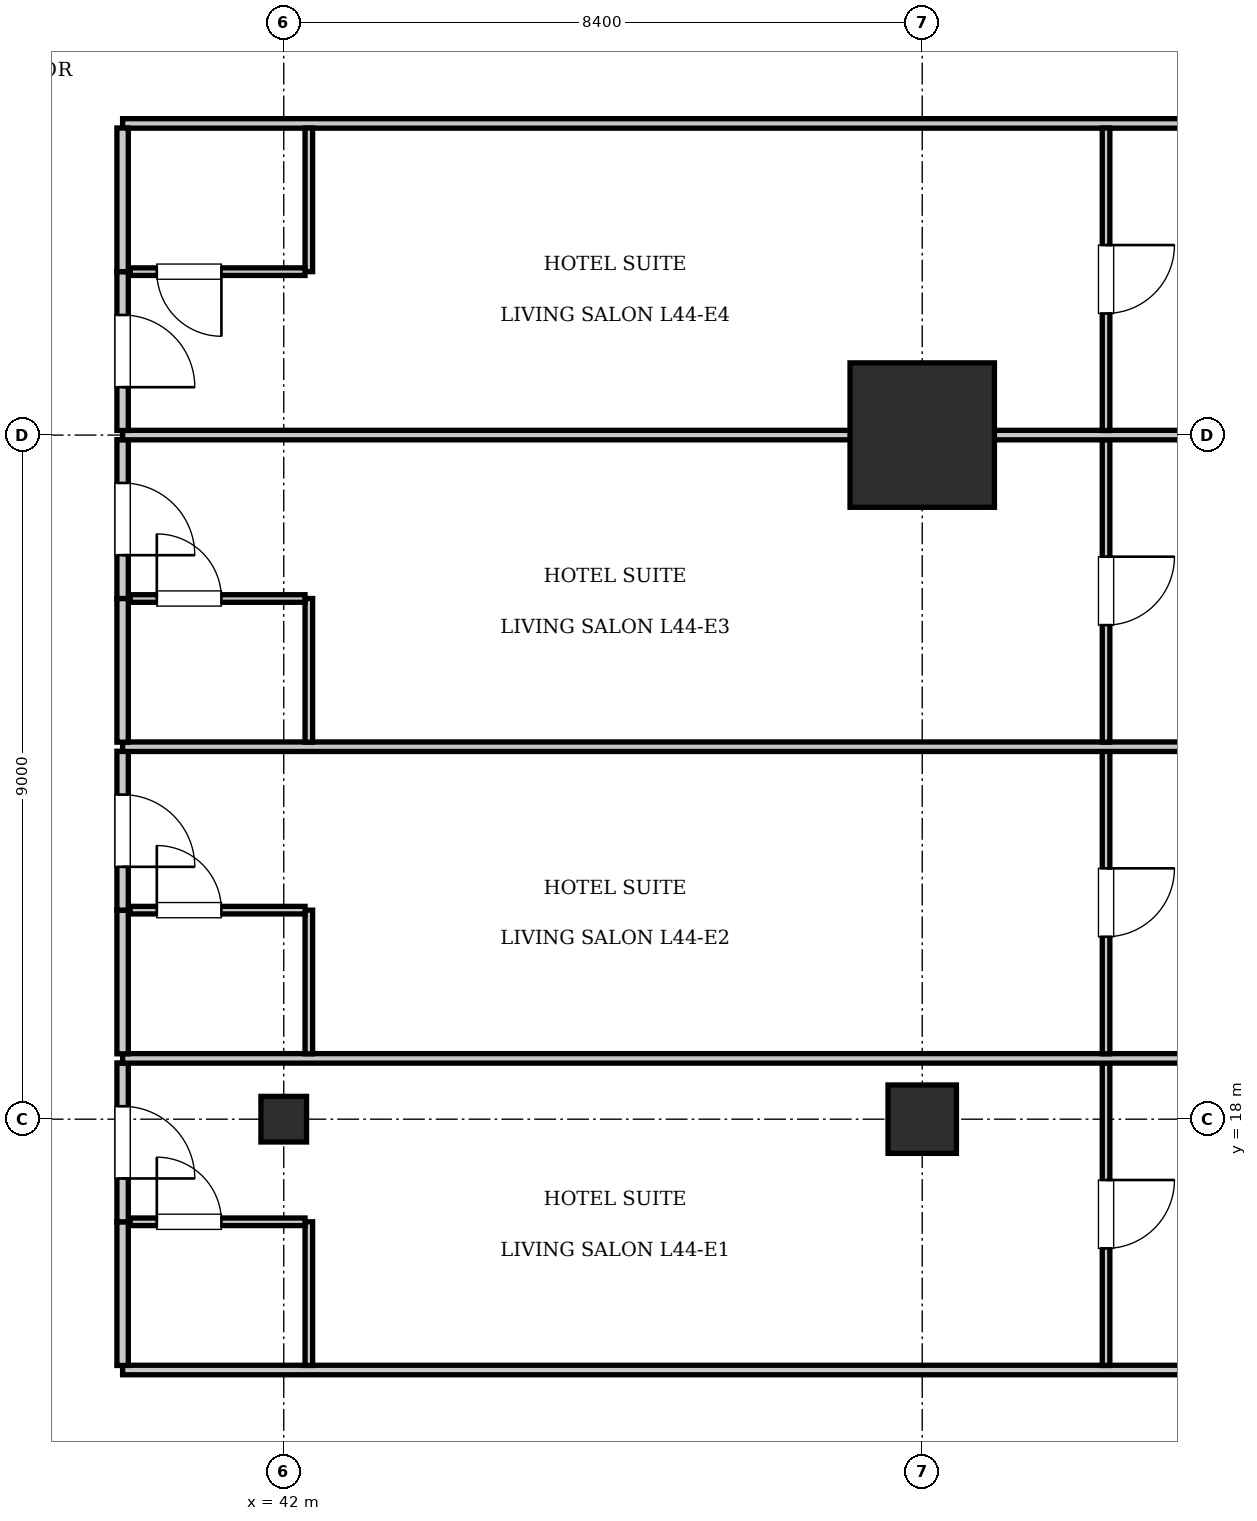
"""IFC4 building model, lengths in metres.
Left out: names, types, materials, properties, quantities, classifications, styles, units other than length and angle.
Written with IfcOpenShell. Run it as: python <this file> out.ifc"""

import sys

from ifc_helpers import new_model, si_unit, direction, frame, frame_2d, origin, origin_2d, place, context, subcontext, project, spatial, rectangle, i_section, extrude, element, fill, save


model = new_model("IFC4")
c1 = context("Model", 3, precision=1e-05, world=origin(), true_north=direction((0.0, 1.0)))
c2 = subcontext(c1, "Body", "Model", "MODEL_VIEW")
j1 = project(units=[si_unit("LENGTHUNIT", "METRE"), si_unit("PLANEANGLEUNIT", "RADIAN")], contexts=[c1])
p1 = place(None, origin())
s1 = spatial("IfcSite", under=j1, at=p1, CompositionType="ELEMENT")
p2 = place(p1, origin())
s2 = spatial("IfcBuilding", under=s1, at=p2, CompositionType="ELEMENT")
p3 = place(p2, frame((0.0, 0.0, 181.3)))
s3 = spatial("IfcBuildingStorey", under=s2, at=p3, CompositionType="ELEMENT", Elevation=181.3)
p4 = place(p3, frame((50.4, 27.0, 0.0), z_axis=(0.0, 0.0, 1.0), x_axis=(1.0, 0.0, 0.0)))
e1 = element("IfcColumn", 1, at=p4, inside=s3, PredefinedType="COLUMN", context=c2, shape_type="SweptSolid", body=[
    extrude(rectangle(XDim=1.9, YDim=1.9, at=origin_2d()), origin(), (0.0, 0.0, 1.0), 3.85),
])
p5 = place(p3, frame((50.4, 18.0, 0.0), z_axis=(0.0, 0.0, 1.0), x_axis=(1.0, 0.0, 0.0)))
e2 = element("IfcColumn", 2, at=p5, inside=s3, PredefinedType="COLUMN", context=c2, shape_type="SweptSolid", body=[
    extrude(rectangle(XDim=0.9, YDim=0.9, at=origin_2d()), origin(), (0.0, 0.0, 1.0), 3.85),
])
p6 = place(p3, frame((42.0, 18.0, 0.0), z_axis=(0.0, 0.0, 1.0), x_axis=(1.0, 0.0, 0.0)))
e3 = element("IfcColumn", 3, at=p6, inside=s3, PredefinedType="COLUMN", context=c2, shape_type="SweptSolid", body=[
    extrude(i_section(OverallWidth=0.6, OverallDepth=0.6, WebThickness=0.025, FlangeThickness=0.038, at=origin_2d()), origin(), (0.0, 0.0, 1.0), 3.85),
])
for number, where, z_axis, x_axis in (
    (4, (39.88, 14.7, 0.0), (0.0, 0.0, 1.0), (1.0, 0.0, 0.0)),
    (5, (39.88, 31.1, 0.0), (0.0, 0.0, 1.0), (1.0, 0.0, 0.0)),
):
    element("IfcWall", number, at=place(p3, frame(where, z_axis=z_axis, x_axis=x_axis)), inside=s3, PredefinedType="PARTITIONING", context=c2, shape_type="SweptSolid", body=[
        extrude(rectangle(XDim=22.52, YDim=0.125, at=frame_2d((11.26, 0.0))), origin(), (0.0, 0.0, 1.0), 3.61),
    ])
p7 = place(p3, frame((39.88, 14.76, 0.0), z_axis=(0.0, 0.0, 1.0), x_axis=(0.0, 1.0, 0.0)))
e6 = element("IfcWall", 6, at=p7, inside=s3, PredefinedType="PARTITIONING", context=c2, shape_type="SweptSolid", body=[
    extrude(rectangle(XDim=1.89, YDim=0.15, at=frame_2d((0.945, 0.0))), origin(), (0.0, 0.0, 1.0), 3.61),
])
p8 = place(p3, frame((39.88, 16.65, 0.0), z_axis=(0.0, 0.0, 1.0), x_axis=(0.0, 1.0, 0.0)))
e7 = element("IfcWall", 7, at=p8, inside=s3, PredefinedType="PARTITIONING", context=c2, shape_type="SweptSolid", body=[
    extrude(rectangle(XDim=2.09, YDim=0.15, at=frame_2d((1.045, 0.0))), origin(), (0.0, 0.0, 1.0), 3.61),
])
p9 = place(p8, frame((0.57, 0.0, 0.0)))
e8 = element("IfcOpeningElement", 8, at=p9, cuts=e7, PredefinedType="OPENING", context=c2, shape_type="SweptSolid", body=[
    extrude(rectangle(XDim=0.95, YDim=2.15, at=frame_2d((0.475, 1.075))), frame((0.0, 0.085, 0.0), z_axis=(0.0, -1.0, 0.0), x_axis=(1.0, 0.0, 0.0)), (0.0, 0.0, 1.0), 0.17),
])
p10 = place(p3, frame((42.33, 14.76, 0.0), z_axis=(0.0, 0.0, 1.0), x_axis=(0.0, 1.0, 0.0)))
e9 = element("IfcWall", 9, at=p10, inside=s3, PredefinedType="PARTITIONING", context=c2, shape_type="SweptSolid", body=[
    extrude(rectangle(XDim=1.89, YDim=0.1, at=frame_2d((0.945, 0.0))), origin(), (0.0, 0.0, 1.0), 3.61),
])
p11 = place(p3, frame((39.98, 16.65, 0.0), z_axis=(0.0, 0.0, 1.0), x_axis=(1.0, 0.0, 0.0)))
e10 = element("IfcWall", 10, at=p11, inside=s3, PredefinedType="PARTITIONING", context=c2, shape_type="SweptSolid", body=[
    extrude(rectangle(XDim=2.3, YDim=0.1, at=frame_2d((1.15, 0.0))), origin(), (0.0, 0.0, 1.0), 3.61),
])
p12 = place(p11, frame((0.35, 0.0, 0.0)))
e11 = element("IfcOpeningElement", 11, at=p12, cuts=e10, PredefinedType="OPENING", context=c2, shape_type="SweptSolid", body=[
    extrude(rectangle(XDim=0.85, YDim=2.1, at=frame_2d((0.425, 1.05))), frame((0.0, 0.06, 0.0), z_axis=(0.0, -1.0, 0.0), x_axis=(1.0, 0.0, 0.0)), (0.0, 0.0, 1.0), 0.12),
])
p13 = place(p3, frame((52.818, 14.76, 0.0), z_axis=(0.0, 0.0, 1.0), x_axis=(0.0, 1.0, 0.0)))
e12 = element("IfcWall", 12, at=p13, inside=s3, PredefinedType="PARTITIONING", context=c2, shape_type="SweptSolid", body=[
    extrude(rectangle(XDim=3.98, YDim=0.1, at=frame_2d((1.99, 0.0))), origin(), (0.0, 0.0, 1.0), 3.61),
])
p14 = place(p13, frame((1.54, 0.0, 0.0)))
e13 = element("IfcOpeningElement", 13, at=p14, cuts=e12, PredefinedType="OPENING", context=c2, shape_type="SweptSolid", body=[
    extrude(rectangle(XDim=0.9, YDim=2.1, at=frame_2d((0.45, 1.05))), frame((0.0, 0.06, 0.0), z_axis=(0.0, -1.0, 0.0), x_axis=(1.0, 0.0, 0.0)), (0.0, 0.0, 1.0), 0.12),
])
p15 = place(p3, frame((39.88, 18.8, 0.0), z_axis=(0.0, 0.0, 1.0), x_axis=(1.0, 0.0, 0.0)))
e14 = element("IfcWall", 14, at=p15, inside=s3, PredefinedType="PARTITIONING", context=c2, shape_type="SweptSolid", body=[
    extrude(rectangle(XDim=22.52, YDim=0.125, at=frame_2d((11.26, 0.0))), origin(), (0.0, 0.0, 1.0), 3.61),
])
p16 = place(p3, frame((39.88, 18.86, 0.0), z_axis=(0.0, 0.0, 1.0), x_axis=(0.0, 1.0, 0.0)))
e15 = element("IfcWall", 15, at=p16, inside=s3, PredefinedType="PARTITIONING", context=c2, shape_type="SweptSolid", body=[
    extrude(rectangle(XDim=1.89, YDim=0.15, at=frame_2d((0.945, 0.0))), origin(), (0.0, 0.0, 1.0), 3.61),
])
p17 = place(p3, frame((39.88, 20.75, 0.0), z_axis=(0.0, 0.0, 1.0), x_axis=(0.0, 1.0, 0.0)))
e16 = element("IfcWall", 16, at=p17, inside=s3, PredefinedType="PARTITIONING", context=c2, shape_type="SweptSolid", body=[
    extrude(rectangle(XDim=2.09, YDim=0.15, at=frame_2d((1.045, 0.0))), origin(), (0.0, 0.0, 1.0), 3.61),
])
p18 = place(p17, frame((0.57, 0.0, 0.0)))
e17 = element("IfcOpeningElement", 17, at=p18, cuts=e16, PredefinedType="OPENING", context=c2, shape_type="SweptSolid", body=[
    extrude(rectangle(XDim=0.95, YDim=2.15, at=frame_2d((0.475, 1.075))), frame((0.0, 0.085, 0.0), z_axis=(0.0, -1.0, 0.0), x_axis=(1.0, 0.0, 0.0)), (0.0, 0.0, 1.0), 0.17),
])
p19 = place(p3, frame((42.33, 18.86, 0.0), z_axis=(0.0, 0.0, 1.0), x_axis=(0.0, 1.0, 0.0)))
e18 = element("IfcWall", 18, at=p19, inside=s3, PredefinedType="PARTITIONING", context=c2, shape_type="SweptSolid", body=[
    extrude(rectangle(XDim=1.89, YDim=0.1, at=frame_2d((0.945, 0.0))), origin(), (0.0, 0.0, 1.0), 3.61),
])
p20 = place(p3, frame((39.98, 20.75, 0.0), z_axis=(0.0, 0.0, 1.0), x_axis=(1.0, 0.0, 0.0)))
e19 = element("IfcWall", 19, at=p20, inside=s3, PredefinedType="PARTITIONING", context=c2, shape_type="SweptSolid", body=[
    extrude(rectangle(XDim=2.3, YDim=0.1, at=frame_2d((1.15, 0.0))), origin(), (0.0, 0.0, 1.0), 3.61),
])
p21 = place(p20, frame((0.35, 0.0, 0.0)))
e20 = element("IfcOpeningElement", 20, at=p21, cuts=e19, PredefinedType="OPENING", context=c2, shape_type="SweptSolid", body=[
    extrude(rectangle(XDim=0.85, YDim=2.1, at=frame_2d((0.425, 1.05))), frame((0.0, 0.06, 0.0), z_axis=(0.0, -1.0, 0.0), x_axis=(1.0, 0.0, 0.0)), (0.0, 0.0, 1.0), 0.12),
])
p22 = place(p3, frame((52.818, 18.86, 0.0), z_axis=(0.0, 0.0, 1.0), x_axis=(0.0, 1.0, 0.0)))
e21 = element("IfcWall", 21, at=p22, inside=s3, PredefinedType="PARTITIONING", context=c2, shape_type="SweptSolid", body=[
    extrude(rectangle(XDim=3.98, YDim=0.1, at=frame_2d((1.99, 0.0))), origin(), (0.0, 0.0, 1.0), 3.61),
])
p23 = place(p22, frame((1.54, 0.0, 0.0)))
e22 = element("IfcOpeningElement", 22, at=p23, cuts=e21, PredefinedType="OPENING", context=c2, shape_type="SweptSolid", body=[
    extrude(rectangle(XDim=0.9, YDim=2.1, at=frame_2d((0.45, 1.05))), frame((0.0, 0.06, 0.0), z_axis=(0.0, -1.0, 0.0), x_axis=(1.0, 0.0, 0.0)), (0.0, 0.0, 1.0), 0.12),
])
p24 = place(p3, frame((39.88, 22.9, 0.0), z_axis=(0.0, 0.0, 1.0), x_axis=(1.0, 0.0, 0.0)))
e23 = element("IfcWall", 23, at=p24, inside=s3, PredefinedType="PARTITIONING", context=c2, shape_type="SweptSolid", body=[
    extrude(rectangle(XDim=22.52, YDim=0.125, at=frame_2d((11.26, 0.0))), origin(), (0.0, 0.0, 1.0), 3.61),
])
p25 = place(p3, frame((39.88, 22.96, 0.0), z_axis=(0.0, 0.0, 1.0), x_axis=(0.0, 1.0, 0.0)))
e24 = element("IfcWall", 24, at=p25, inside=s3, PredefinedType="PARTITIONING", context=c2, shape_type="SweptSolid", body=[
    extrude(rectangle(XDim=1.89, YDim=0.15, at=frame_2d((0.945, 0.0))), origin(), (0.0, 0.0, 1.0), 3.61),
])
p26 = place(p3, frame((39.88, 24.85, 0.0), z_axis=(0.0, 0.0, 1.0), x_axis=(0.0, 1.0, 0.0)))
e25 = element("IfcWall", 25, at=p26, inside=s3, PredefinedType="PARTITIONING", context=c2, shape_type="SweptSolid", body=[
    extrude(rectangle(XDim=2.09, YDim=0.15, at=frame_2d((1.045, 0.0))), origin(), (0.0, 0.0, 1.0), 3.61),
])
p27 = place(p26, frame((0.57, 0.0, 0.0)))
e26 = element("IfcOpeningElement", 26, at=p27, cuts=e25, PredefinedType="OPENING", context=c2, shape_type="SweptSolid", body=[
    extrude(rectangle(XDim=0.95, YDim=2.15, at=frame_2d((0.475, 1.075))), frame((0.0, 0.085, 0.0), z_axis=(0.0, -1.0, 0.0), x_axis=(1.0, 0.0, 0.0)), (0.0, 0.0, 1.0), 0.17),
])
p28 = place(p3, frame((42.33, 22.96, 0.0), z_axis=(0.0, 0.0, 1.0), x_axis=(0.0, 1.0, 0.0)))
e27 = element("IfcWall", 27, at=p28, inside=s3, PredefinedType="PARTITIONING", context=c2, shape_type="SweptSolid", body=[
    extrude(rectangle(XDim=1.89, YDim=0.1, at=frame_2d((0.945, 0.0))), origin(), (0.0, 0.0, 1.0), 3.61),
])
p29 = place(p3, frame((39.98, 24.85, 0.0), z_axis=(0.0, 0.0, 1.0), x_axis=(1.0, 0.0, 0.0)))
e28 = element("IfcWall", 28, at=p29, inside=s3, PredefinedType="PARTITIONING", context=c2, shape_type="SweptSolid", body=[
    extrude(rectangle(XDim=2.3, YDim=0.1, at=frame_2d((1.15, 0.0))), origin(), (0.0, 0.0, 1.0), 3.61),
])
p30 = place(p29, frame((0.35, 0.0, 0.0)))
e29 = element("IfcOpeningElement", 29, at=p30, cuts=e28, PredefinedType="OPENING", context=c2, shape_type="SweptSolid", body=[
    extrude(rectangle(XDim=0.85, YDim=2.1, at=frame_2d((0.425, 1.05))), frame((0.0, 0.06, 0.0), z_axis=(0.0, -1.0, 0.0), x_axis=(1.0, 0.0, 0.0)), (0.0, 0.0, 1.0), 0.12),
])
p31 = place(p3, frame((52.818, 22.96, 0.0), z_axis=(0.0, 0.0, 1.0), x_axis=(0.0, 1.0, 0.0)))
e30 = element("IfcWall", 30, at=p31, inside=s3, PredefinedType="PARTITIONING", context=c2, shape_type="SweptSolid", body=[
    extrude(rectangle(XDim=3.98, YDim=0.1, at=frame_2d((1.99, 0.0))), origin(), (0.0, 0.0, 1.0), 3.61),
])
p32 = place(p31, frame((1.54, 0.0, 0.0)))
e31 = element("IfcOpeningElement", 31, at=p32, cuts=e30, PredefinedType="OPENING", context=c2, shape_type="SweptSolid", body=[
    extrude(rectangle(XDim=0.9, YDim=2.1, at=frame_2d((0.45, 1.05))), frame((0.0, 0.06, 0.0), z_axis=(0.0, -1.0, 0.0), x_axis=(1.0, 0.0, 0.0)), (0.0, 0.0, 1.0), 0.12),
])
p33 = place(p3, frame((39.88, 27.0, 0.0), z_axis=(0.0, 0.0, 1.0), x_axis=(1.0, 0.0, 0.0)))
e32 = element("IfcWall", 32, at=p33, inside=s3, PredefinedType="PARTITIONING", context=c2, shape_type="SweptSolid", body=[
    extrude(rectangle(XDim=22.52, YDim=0.125, at=frame_2d((11.26, 0.0))), origin(), (0.0, 0.0, 1.0), 2.41),
])
p34 = place(p3, frame((39.88, 27.06, 0.0), z_axis=(0.0, 0.0, 1.0), x_axis=(0.0, 1.0, 0.0)))
e33 = element("IfcWall", 33, at=p34, inside=s3, PredefinedType="PARTITIONING", context=c2, shape_type="SweptSolid", body=[
    extrude(rectangle(XDim=2.09, YDim=0.15, at=frame_2d((1.045, 0.0))), origin(), (0.0, 0.0, 1.0), 3.61),
])
p35 = place(p34, frame((0.57, 0.0, 0.0)))
e34 = element("IfcOpeningElement", 34, at=p35, cuts=e33, PredefinedType="OPENING", context=c2, shape_type="SweptSolid", body=[
    extrude(rectangle(XDim=0.95, YDim=2.15, at=frame_2d((0.475, 1.075))), frame((0.0, 0.085, 0.0), z_axis=(0.0, -1.0, 0.0), x_axis=(1.0, 0.0, 0.0)), (0.0, 0.0, 1.0), 0.17),
])
p36 = place(p3, frame((39.88, 29.15, 0.0), z_axis=(0.0, 0.0, 1.0), x_axis=(0.0, 1.0, 0.0)))
e35 = element("IfcWall", 35, at=p36, inside=s3, PredefinedType="PARTITIONING", context=c2, shape_type="SweptSolid", body=[
    extrude(rectangle(XDim=1.89, YDim=0.15, at=frame_2d((0.945, 0.0))), origin(), (0.0, 0.0, 1.0), 3.61),
])
p37 = place(p3, frame((42.33, 29.15, 0.0), z_axis=(0.0, 0.0, 1.0), x_axis=(0.0, 1.0, 0.0)))
e36 = element("IfcWall", 36, at=p37, inside=s3, PredefinedType="PARTITIONING", context=c2, shape_type="SweptSolid", body=[
    extrude(rectangle(XDim=1.89, YDim=0.1, at=frame_2d((0.945, 0.0))), origin(), (0.0, 0.0, 1.0), 3.61),
])
p38 = place(p3, frame((39.98, 29.15, 0.0), z_axis=(0.0, 0.0, 1.0), x_axis=(1.0, 0.0, 0.0)))
e37 = element("IfcWall", 37, at=p38, inside=s3, PredefinedType="PARTITIONING", context=c2, shape_type="SweptSolid", body=[
    extrude(rectangle(XDim=2.3, YDim=0.1, at=frame_2d((1.15, 0.0))), origin(), (0.0, 0.0, 1.0), 3.61),
])
p39 = place(p38, frame((0.35, 0.0, 0.0)))
e38 = element("IfcOpeningElement", 38, at=p39, cuts=e37, PredefinedType="OPENING", context=c2, shape_type="SweptSolid", body=[
    extrude(rectangle(XDim=0.85, YDim=2.1, at=frame_2d((0.425, 1.05))), frame((0.0, 0.06, 0.0), z_axis=(0.0, -1.0, 0.0), x_axis=(1.0, 0.0, 0.0)), (0.0, 0.0, 1.0), 0.12),
])
p40 = place(p3, frame((52.818, 27.06, 0.0), z_axis=(0.0, 0.0, 1.0), x_axis=(0.0, 1.0, 0.0)))
e39 = element("IfcWall", 39, at=p40, inside=s3, PredefinedType="PARTITIONING", context=c2, shape_type="SweptSolid", body=[
    extrude(rectangle(XDim=3.98, YDim=0.1, at=frame_2d((1.99, 0.0))), origin(), (0.0, 0.0, 1.0), 3.61),
])
p41 = place(p40, frame((1.54, 0.0, 0.0)))
e40 = element("IfcOpeningElement", 40, at=p41, cuts=e39, PredefinedType="OPENING", context=c2, shape_type="SweptSolid", body=[
    extrude(rectangle(XDim=0.9, YDim=2.1, at=frame_2d((0.45, 1.05))), frame((0.0, 0.06, 0.0), z_axis=(0.0, -1.0, 0.0), x_axis=(1.0, 0.0, 0.0)), (0.0, 0.0, 1.0), 0.12),
])
p42 = place(p12, origin())
e41 = element("IfcDoor", 41, at=p42, inside=s3, OperationType="SINGLE_SWING_LEFT", PredefinedType="DOOR", context=c2, shape_type="SweptSolid", body=[
    extrude(rectangle(XDim=0.85, YDim=2.1, at=frame_2d((0.425, 1.05))), frame((0.0, 0.025, 0.0), z_axis=(0.0, -1.0, 0.0), x_axis=(1.0, 0.0, 0.0)), (0.0, 0.0, 1.0), 0.05),
])
fill(e11, e41)
p43 = place(p9, frame((0.95, 0.0, 0.0), z_axis=(0.0, 0.0, 1.0), x_axis=(-1.0, 0.0, 0.0)))
e42 = element("IfcDoor", 42, at=p43, inside=s3, OperationType="SINGLE_SWING_RIGHT", PredefinedType="DOOR", context=c2, shape_type="SweptSolid", body=[
    extrude(rectangle(XDim=0.95, YDim=2.15, at=frame_2d((0.475, 1.075))), frame((0.0, 0.025, 0.0), z_axis=(0.0, -1.0, 0.0), x_axis=(1.0, 0.0, 0.0)), (0.0, 0.0, 1.0), 0.05),
])
fill(e8, e42)
p44 = place(p14, frame((0.9, 0.0, 0.0), z_axis=(0.0, 0.0, 1.0), x_axis=(-1.0, 0.0, 0.0)))
e43 = element("IfcDoor", 43, at=p44, inside=s3, OperationType="SINGLE_SWING_LEFT", PredefinedType="DOOR", context=c2, shape_type="SweptSolid", body=[
    extrude(rectangle(XDim=0.9, YDim=2.1, at=frame_2d((0.45, 1.05))), frame((0.0, 0.025, 0.0), z_axis=(0.0, -1.0, 0.0), x_axis=(1.0, 0.0, 0.0)), (0.0, 0.0, 1.0), 0.05),
])
fill(e13, e43)
p45 = place(p21, origin())
e44 = element("IfcDoor", 44, at=p45, inside=s3, OperationType="SINGLE_SWING_LEFT", PredefinedType="DOOR", context=c2, shape_type="SweptSolid", body=[
    extrude(rectangle(XDim=0.85, YDim=2.1, at=frame_2d((0.425, 1.05))), frame((0.0, 0.025, 0.0), z_axis=(0.0, -1.0, 0.0), x_axis=(1.0, 0.0, 0.0)), (0.0, 0.0, 1.0), 0.05),
])
fill(e20, e44)
p46 = place(p18, frame((0.95, 0.0, 0.0), z_axis=(0.0, 0.0, 1.0), x_axis=(-1.0, 0.0, 0.0)))
e45 = element("IfcDoor", 45, at=p46, inside=s3, OperationType="SINGLE_SWING_RIGHT", PredefinedType="DOOR", context=c2, shape_type="SweptSolid", body=[
    extrude(rectangle(XDim=0.95, YDim=2.15, at=frame_2d((0.475, 1.075))), frame((0.0, 0.025, 0.0), z_axis=(0.0, -1.0, 0.0), x_axis=(1.0, 0.0, 0.0)), (0.0, 0.0, 1.0), 0.05),
])
fill(e17, e45)
p47 = place(p23, frame((0.9, 0.0, 0.0), z_axis=(0.0, 0.0, 1.0), x_axis=(-1.0, 0.0, 0.0)))
e46 = element("IfcDoor", 46, at=p47, inside=s3, OperationType="SINGLE_SWING_LEFT", PredefinedType="DOOR", context=c2, shape_type="SweptSolid", body=[
    extrude(rectangle(XDim=0.9, YDim=2.1, at=frame_2d((0.45, 1.05))), frame((0.0, 0.025, 0.0), z_axis=(0.0, -1.0, 0.0), x_axis=(1.0, 0.0, 0.0)), (0.0, 0.0, 1.0), 0.05),
])
fill(e22, e46)
p48 = place(p30, origin())
e47 = element("IfcDoor", 47, at=p48, inside=s3, OperationType="SINGLE_SWING_LEFT", PredefinedType="DOOR", context=c2, shape_type="SweptSolid", body=[
    extrude(rectangle(XDim=0.85, YDim=2.1, at=frame_2d((0.425, 1.05))), frame((0.0, 0.025, 0.0), z_axis=(0.0, -1.0, 0.0), x_axis=(1.0, 0.0, 0.0)), (0.0, 0.0, 1.0), 0.05),
])
fill(e29, e47)
p49 = place(p27, frame((0.95, 0.0, 0.0), z_axis=(0.0, 0.0, 1.0), x_axis=(-1.0, 0.0, 0.0)))
e48 = element("IfcDoor", 48, at=p49, inside=s3, OperationType="SINGLE_SWING_RIGHT", PredefinedType="DOOR", context=c2, shape_type="SweptSolid", body=[
    extrude(rectangle(XDim=0.95, YDim=2.15, at=frame_2d((0.475, 1.075))), frame((0.0, 0.025, 0.0), z_axis=(0.0, -1.0, 0.0), x_axis=(1.0, 0.0, 0.0)), (0.0, 0.0, 1.0), 0.05),
])
fill(e26, e48)
p50 = place(p32, frame((0.9, 0.0, 0.0), z_axis=(0.0, 0.0, 1.0), x_axis=(-1.0, 0.0, 0.0)))
e49 = element("IfcDoor", 49, at=p50, inside=s3, OperationType="SINGLE_SWING_LEFT", PredefinedType="DOOR", context=c2, shape_type="SweptSolid", body=[
    extrude(rectangle(XDim=0.9, YDim=2.1, at=frame_2d((0.45, 1.05))), frame((0.0, 0.025, 0.0), z_axis=(0.0, -1.0, 0.0), x_axis=(1.0, 0.0, 0.0)), (0.0, 0.0, 1.0), 0.05),
])
fill(e31, e49)
p51 = place(p39, frame((0.85, 0.0, 0.0), z_axis=(0.0, 0.0, 1.0), x_axis=(-1.0, 0.0, 0.0)))
e50 = element("IfcDoor", 50, at=p51, inside=s3, OperationType="SINGLE_SWING_LEFT", PredefinedType="DOOR", context=c2, shape_type="SweptSolid", body=[
    extrude(rectangle(XDim=0.85, YDim=2.1, at=frame_2d((0.425, 1.05))), frame((0.0, 0.025, 0.0), z_axis=(0.0, -1.0, 0.0), x_axis=(1.0, 0.0, 0.0)), (0.0, 0.0, 1.0), 0.05),
])
fill(e38, e50)
p52 = place(p35, frame((0.95, 0.0, 0.0), z_axis=(0.0, 0.0, 1.0), x_axis=(-1.0, 0.0, 0.0)))
e51 = element("IfcDoor", 51, at=p52, inside=s3, OperationType="SINGLE_SWING_RIGHT", PredefinedType="DOOR", context=c2, shape_type="SweptSolid", body=[
    extrude(rectangle(XDim=0.95, YDim=2.15, at=frame_2d((0.475, 1.075))), frame((0.0, 0.025, 0.0), z_axis=(0.0, -1.0, 0.0), x_axis=(1.0, 0.0, 0.0)), (0.0, 0.0, 1.0), 0.05),
])
fill(e34, e51)
p53 = place(p41, frame((0.9, 0.0, 0.0), z_axis=(0.0, 0.0, 1.0), x_axis=(-1.0, 0.0, 0.0)))
e52 = element("IfcDoor", 52, at=p53, inside=s3, OperationType="SINGLE_SWING_LEFT", PredefinedType="DOOR", context=c2, shape_type="SweptSolid", body=[
    extrude(rectangle(XDim=0.9, YDim=2.1, at=frame_2d((0.45, 1.05))), frame((0.0, 0.025, 0.0), z_axis=(0.0, -1.0, 0.0), x_axis=(1.0, 0.0, 0.0)), (0.0, 0.0, 1.0), 0.05),
])
fill(e40, e52)
save(model, sys.argv[1])
